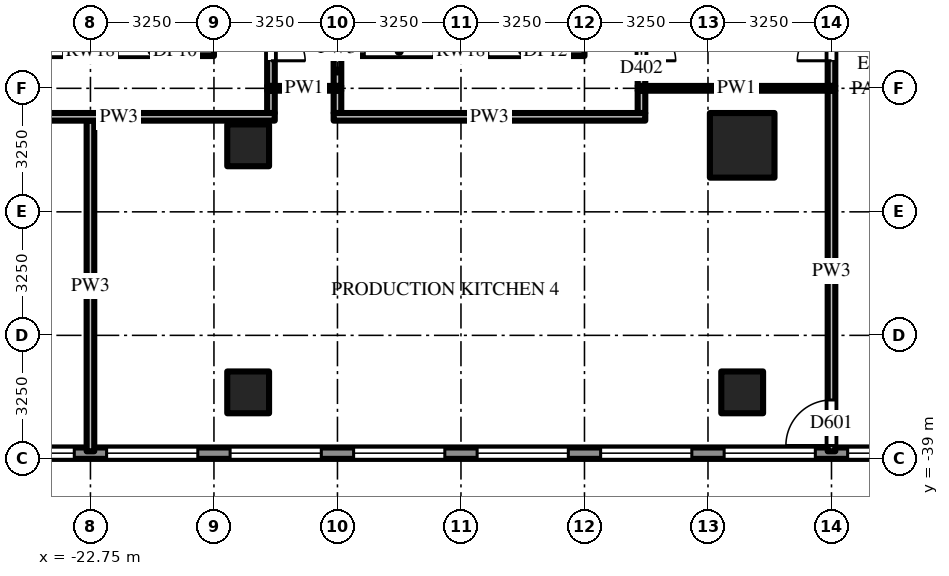
"""IFC4 building model, lengths in metres.
Left out: names, types, materials, properties, quantities, classifications, styles, units other than length and angle.
Written with IfcOpenShell. Run it as: python <this file> out.ifc"""

import sys

from ifc_helpers import new_model, si_unit, direction, frame, frame_2d, origin, origin_2d, place, context, subcontext, project, spatial, rectangle, extrude, source, transform, mapped, element, fill, save


model = new_model("IFC4")
c1 = context("Model", 3, precision=1e-05, world=origin(), true_north=direction((0.0, 1.0)))
c2 = subcontext(c1, "Body", "Model", "MODEL_VIEW")
j1 = project(units=[si_unit("LENGTHUNIT", "METRE"), si_unit("PLANEANGLEUNIT", "RADIAN")], contexts=[c1])
p1 = place(None, origin())
s1 = spatial("IfcSite", under=j1, at=p1, CompositionType="ELEMENT")
p2 = place(p1, origin())
s2 = spatial("IfcBuilding", under=s1, at=p2, CompositionType="ELEMENT")
p3 = place(p2, frame((0.0, 0.0, 14.0)))
s3 = spatial("IfcBuildingStorey", under=s2, at=p3, CompositionType="ELEMENT", Elevation=14.0)
m1 = source(origin(), c2, "Body", "SweptSolid", [
    extrude(rectangle(XDim=1.7, YDim=1.7, at=origin_2d()), origin(), (0.0, 0.0, 1.0), 5.0),
])
p4 = place(p3, frame((-5.6, -30.75, 0.0), z_axis=(0.0, 0.0, 1.0), x_axis=(1.0, 0.0, 0.0)))
e1 = element("IfcColumn", 1, at=p4, inside=s3, PredefinedType="COLUMN", context=c2, shape_type="MappedRepresentation", body=[
    mapped(m1, transform((0.0, 0.0, 0.0))),
])
m2 = source(origin(), c2, "Body", "SweptSolid", [
    extrude(rectangle(XDim=1.1, YDim=1.1, at=origin_2d()), origin(), (0.0, 0.0, 1.0), 5.0),
])
for number, where, z_axis, x_axis in (
    (2, (-5.6, -37.25, 0.0), (0.0, 0.0, 1.0), (1.0, 0.0, 0.0)),
    (3, (-18.6, -30.75, 0.0), (0.0, 0.0, 1.0), (1.0, 0.0, 0.0)),
    (4, (-18.6, -37.25, 0.0), (0.0, 0.0, 1.0), (1.0, 0.0, 0.0)),
):
    element("IfcColumn", number, at=place(p3, frame(where, z_axis=z_axis, x_axis=x_axis)), inside=s3, PredefinedType="COLUMN", context=c2, shape_type="MappedRepresentation", body=[
        mapped(m2, transform((0.0, 0.0, 0.0))),
    ])
m3 = source(origin(), c2, "Body", "SweptSolid", [
    extrude(rectangle(XDim=6.5, YDim=0.25, at=frame_2d((3.25, 0.0))), origin(), (0.0, 0.0, 1.0), 4.7),
])
p5 = place(p3, frame((-26.0, -28.275, 0.0), z_axis=(0.0, 0.0, 1.0), x_axis=(1.0, 0.0, 0.0)))
e5 = element("IfcWall", 5, at=p5, inside=s3, PredefinedType="SHEAR", context=c2, shape_type="MappedRepresentation", body=[
    mapped(m3, transform((0.0, 0.0, 0.0))),
])
m4 = source(origin(), c2, "Body", "SweptSolid", [
    extrude(rectangle(XDim=1.8, YDim=2.1, at=frame_2d((0.9, 1.05))), frame((0.0, 0.135, 0.0), z_axis=(0.0, -1.0, 0.0), x_axis=(1.0, 0.0, 0.0)), (0.0, 0.0, 1.0), 0.27),
])
p6 = place(p5, frame((0.725, 0.0, 0.0)))
e6 = element("IfcOpeningElement", 6, at=p6, cuts=e5, PredefinedType="OPENING", context=c2, shape_type="MappedRepresentation", body=[
    mapped(m4, transform((0.0, 0.0, 0.0))),
])
p7 = place(p5, frame((3.975, 0.0, 0.0)))
e7 = element("IfcOpeningElement", 7, at=p7, cuts=e5, PredefinedType="OPENING", context=c2, shape_type="MappedRepresentation", body=[
    mapped(m4, transform((0.0, 0.0, 0.0))),
])
p8 = place(p3, frame((-16.25, -28.275, 0.0), z_axis=(0.0, 0.0, 1.0), x_axis=(1.0, 0.0, 0.0)))
e8 = element("IfcWall", 8, at=p8, inside=s3, PredefinedType="SHEAR", context=c2, shape_type="MappedRepresentation", body=[
    mapped(m3, transform((0.0, 0.0, 0.0))),
])
p9 = place(p8, frame((0.725, 0.0, 0.0)))
e9 = element("IfcOpeningElement", 9, at=p9, cuts=e8, PredefinedType="OPENING", context=c2, shape_type="MappedRepresentation", body=[
    mapped(m4, transform((0.0, 0.0, 0.0))),
])
p10 = place(p8, frame((3.975, 0.0, 0.0)))
e10 = element("IfcOpeningElement", 10, at=p10, cuts=e8, PredefinedType="OPENING", context=c2, shape_type="MappedRepresentation", body=[
    mapped(m4, transform((0.0, 0.0, 0.0))),
])
m5 = source(origin(), c2, "Body", "SweptSolid", [
    extrude(rectangle(XDim=71.5, YDim=0.3, at=frame_2d((35.75, 0.0))), origin(), (0.0, 0.0, 1.0), 4.7),
])
p11 = place(p3, frame((-35.75, -38.85, 0.0), z_axis=(0.0, 0.0, 1.0), x_axis=(1.0, 0.0, 0.0)))
e11 = element("IfcWall", 11, at=p11, inside=s3, PredefinedType="SOLIDWALL", context=c2, shape_type="MappedRepresentation", body=[
    mapped(m5, transform((0.0, 0.0, 0.0))),
])
m6 = source(origin(), c2, "Body", "SweptSolid", [
    extrude(rectangle(XDim=2.4, YDim=3.0, at=frame_2d((1.2, 1.5))), frame((0.0, 0.16, 0.0), z_axis=(0.0, -1.0, 0.0), x_axis=(1.0, 0.0, 0.0)), (0.0, 0.0, 1.0), 0.32),
])
p12 = place(p11, frame((0.425, 0.0, 0.9)))
e12 = element("IfcOpeningElement", 12, at=p12, cuts=e11, PredefinedType="OPENING", context=c2, shape_type="MappedRepresentation", body=[
    mapped(m6, transform((0.0, 0.0, 0.0))),
])
p13 = place(p11, frame((3.675, 0.0, 0.9)))
e13 = element("IfcOpeningElement", 13, at=p13, cuts=e11, PredefinedType="OPENING", context=c2, shape_type="MappedRepresentation", body=[
    mapped(m6, transform((0.0, 0.0, 0.0))),
])
p14 = place(p11, frame((6.925, 0.0, 0.9)))
e14 = element("IfcOpeningElement", 14, at=p14, cuts=e11, PredefinedType="OPENING", context=c2, shape_type="MappedRepresentation", body=[
    mapped(m6, transform((0.0, 0.0, 0.0))),
])
p15 = place(p11, frame((10.175, 0.0, 0.9)))
e15 = element("IfcOpeningElement", 15, at=p15, cuts=e11, PredefinedType="OPENING", context=c2, shape_type="MappedRepresentation", body=[
    mapped(m6, transform((0.0, 0.0, 0.0))),
])
p16 = place(p11, frame((13.425, 0.0, 0.9)))
e16 = element("IfcOpeningElement", 16, at=p16, cuts=e11, PredefinedType="OPENING", context=c2, shape_type="MappedRepresentation", body=[
    mapped(m6, transform((0.0, 0.0, 0.0))),
])
p17 = place(p11, frame((16.675, 0.0, 0.9)))
e17 = element("IfcOpeningElement", 17, at=p17, cuts=e11, PredefinedType="OPENING", context=c2, shape_type="MappedRepresentation", body=[
    mapped(m6, transform((0.0, 0.0, 0.0))),
])
p18 = place(p11, frame((19.925, 0.0, 0.9)))
e18 = element("IfcOpeningElement", 18, at=p18, cuts=e11, PredefinedType="OPENING", context=c2, shape_type="MappedRepresentation", body=[
    mapped(m6, transform((0.0, 0.0, 0.0))),
])
p19 = place(p11, frame((23.175, 0.0, 0.9)))
e19 = element("IfcOpeningElement", 19, at=p19, cuts=e11, PredefinedType="OPENING", context=c2, shape_type="MappedRepresentation", body=[
    mapped(m6, transform((0.0, 0.0, 0.0))),
])
p20 = place(p11, frame((26.425, 0.0, 0.9)))
e20 = element("IfcOpeningElement", 20, at=p20, cuts=e11, PredefinedType="OPENING", context=c2, shape_type="MappedRepresentation", body=[
    mapped(m6, transform((0.0, 0.0, 0.0))),
])
p21 = place(p11, frame((29.675, 0.0, 0.9)))
e21 = element("IfcOpeningElement", 21, at=p21, cuts=e11, PredefinedType="OPENING", context=c2, shape_type="MappedRepresentation", body=[
    mapped(m6, transform((0.0, 0.0, 0.0))),
])
p22 = place(p11, frame((32.925, 0.0, 0.9)))
e22 = element("IfcOpeningElement", 22, at=p22, cuts=e11, PredefinedType="OPENING", context=c2, shape_type="MappedRepresentation", body=[
    mapped(m6, transform((0.0, 0.0, 0.0))),
])
p23 = place(p11, frame((36.175, 0.0, 0.9)))
e23 = element("IfcOpeningElement", 23, at=p23, cuts=e11, PredefinedType="OPENING", context=c2, shape_type="MappedRepresentation", body=[
    mapped(m6, transform((0.0, 0.0, 0.0))),
])
p24 = place(p11, frame((39.425, 0.0, 0.9)))
e24 = element("IfcOpeningElement", 24, at=p24, cuts=e11, PredefinedType="OPENING", context=c2, shape_type="MappedRepresentation", body=[
    mapped(m6, transform((0.0, 0.0, 0.0))),
])
p25 = place(p11, frame((42.675, 0.0, 0.9)))
e25 = element("IfcOpeningElement", 25, at=p25, cuts=e11, PredefinedType="OPENING", context=c2, shape_type="MappedRepresentation", body=[
    mapped(m6, transform((0.0, 0.0, 0.0))),
])
p26 = place(p11, frame((45.925, 0.0, 0.9)))
e26 = element("IfcOpeningElement", 26, at=p26, cuts=e11, PredefinedType="OPENING", context=c2, shape_type="MappedRepresentation", body=[
    mapped(m6, transform((0.0, 0.0, 0.0))),
])
p27 = place(p11, frame((49.175, 0.0, 0.9)))
e27 = element("IfcOpeningElement", 27, at=p27, cuts=e11, PredefinedType="OPENING", context=c2, shape_type="MappedRepresentation", body=[
    mapped(m6, transform((0.0, 0.0, 0.0))),
])
p28 = place(p11, frame((52.425, 0.0, 0.9)))
e28 = element("IfcOpeningElement", 28, at=p28, cuts=e11, PredefinedType="OPENING", context=c2, shape_type="MappedRepresentation", body=[
    mapped(m6, transform((0.0, 0.0, 0.0))),
])
p29 = place(p11, frame((55.675, 0.0, 0.9)))
e29 = element("IfcOpeningElement", 29, at=p29, cuts=e11, PredefinedType="OPENING", context=c2, shape_type="MappedRepresentation", body=[
    mapped(m6, transform((0.0, 0.0, 0.0))),
])
p30 = place(p11, frame((58.925, 0.0, 0.9)))
e30 = element("IfcOpeningElement", 30, at=p30, cuts=e11, PredefinedType="OPENING", context=c2, shape_type="MappedRepresentation", body=[
    mapped(m6, transform((0.0, 0.0, 0.0))),
])
p31 = place(p11, frame((62.175, 0.0, 0.9)))
e31 = element("IfcOpeningElement", 31, at=p31, cuts=e11, PredefinedType="OPENING", context=c2, shape_type="MappedRepresentation", body=[
    mapped(m6, transform((0.0, 0.0, 0.0))),
])
p32 = place(p11, frame((65.425, 0.0, 0.9)))
e32 = element("IfcOpeningElement", 32, at=p32, cuts=e11, PredefinedType="OPENING", context=c2, shape_type="MappedRepresentation", body=[
    mapped(m6, transform((0.0, 0.0, 0.0))),
])
p33 = place(p11, frame((68.675, 0.0, 0.9)))
e33 = element("IfcOpeningElement", 33, at=p33, cuts=e11, PredefinedType="OPENING", context=c2, shape_type="MappedRepresentation", body=[
    mapped(m6, transform((0.0, 0.0, 0.0))),
])
m7 = source(origin(), c2, "Body", "SweptSolid", [
    extrude(rectangle(XDim=8.7, YDim=0.2, at=frame_2d((4.35, 0.0))), origin(), (0.0, 0.0, 1.0), 3.762),
])
p34 = place(p3, frame((-22.75, -38.8, 0.0), z_axis=(0.0, 0.0, 1.0), x_axis=(0.0, 1.0, 0.0)))
e34 = element("IfcWall", 34, at=p34, inside=s3, PredefinedType="PARTITIONING", context=c2, shape_type="MappedRepresentation", body=[
    mapped(m7, transform((0.0, 0.0, 0.0))),
])
m8 = source(origin(), c2, "Body", "SweptSolid", [
    extrude(rectangle(XDim=3.087, YDim=0.2, at=frame_2d((1.544, 0.0))), origin(), (0.0, 0.0, 1.0), 4.274),
])
p35 = place(p3, frame((-18.0, -26.1, 0.0), z_axis=(0.0, 0.0, 1.0), x_axis=(0.0, -1.0, 0.0)))
e35 = element("IfcWall", 35, at=p35, inside=s3, PredefinedType="PARTITIONING", context=c2, shape_type="MappedRepresentation", body=[
    mapped(m8, transform((0.0, 0.0, 0.0))),
])
m9 = source(origin(), c2, "Body", "SweptSolid", [
    extrude(rectangle(XDim=1.8, YDim=2.1, at=frame_2d((0.9, 1.05))), frame((0.0, 0.11, 0.0), z_axis=(0.0, -1.0, 0.0), x_axis=(1.0, 0.0, 0.0)), (0.0, 0.0, 1.0), 0.22),
])
p36 = place(p35, frame((0.625, 0.0, 0.0)))
e36 = element("IfcOpeningElement", 36, at=p36, cuts=e35, PredefinedType="OPENING", context=c2, shape_type="MappedRepresentation", body=[
    mapped(m9, transform((0.0, 0.0, 0.0))),
])
m10 = source(origin(), c2, "Body", "SweptSolid", [
    extrude(rectangle(XDim=0.587, YDim=0.2, at=frame_2d((0.294, 0.0))), origin(), (0.0, 0.0, 1.0), 4.7),
])
p37 = place(p3, frame((-18.0, -29.312, 0.0), z_axis=(0.0, 0.0, 1.0), x_axis=(0.0, -1.0, 0.0)))
e37 = element("IfcWall", 37, at=p37, inside=s3, PredefinedType="PARTITIONING", context=c2, shape_type="MappedRepresentation", body=[
    mapped(m10, transform((0.0, 0.0, 0.0))),
])
m11 = source(origin(), c2, "Body", "SweptSolid", [
    extrude(rectangle(XDim=0.788, YDim=0.2, at=frame_2d((0.394, 0.0))), origin(), (0.0, 0.0, 1.0), 4.7),
])
p38 = place(p3, frame((-16.25, -29.188, 0.0), z_axis=(0.0, 0.0, 1.0), x_axis=(0.0, 1.0, 0.0)))
e38 = element("IfcWall", 38, at=p38, inside=s3, PredefinedType="PARTITIONING", context=c2, shape_type="MappedRepresentation", body=[
    mapped(m11, transform((0.0, 0.0, 0.0))),
])
p39 = place(p3, frame((-16.25, -29.312, 0.0), z_axis=(0.0, 0.0, 1.0), x_axis=(0.0, -1.0, 0.0)))
e39 = element("IfcWall", 39, at=p39, inside=s3, PredefinedType="PARTITIONING", context=c2, shape_type="MappedRepresentation", body=[
    mapped(m10, transform((0.0, 0.0, 0.0))),
])
p40 = place(p3, frame((-8.25, -26.1, 0.0), z_axis=(0.0, 0.0, 1.0), x_axis=(0.0, -1.0, 0.0)))
e40 = element("IfcWall", 40, at=p40, inside=s3, PredefinedType="PARTITIONING", context=c2, shape_type="MappedRepresentation", body=[
    mapped(m8, transform((0.0, 0.0, 0.0))),
])
p41 = place(p40, frame((0.625, 0.0, 0.0)))
e41 = element("IfcOpeningElement", 41, at=p41, cuts=e40, PredefinedType="OPENING", context=c2, shape_type="MappedRepresentation", body=[
    mapped(m9, transform((0.0, 0.0, 0.0))),
])
p42 = place(p3, frame((-8.25, -29.9, 0.0), z_axis=(0.0, 0.0, 1.0), x_axis=(0.0, 1.0, 0.0)))
e42 = element("IfcWall", 42, at=p42, inside=s3, PredefinedType="PARTITIONING", context=c2, shape_type="MappedRepresentation", body=[
    mapped(m10, transform((0.0, 0.0, 0.0))),
])
m12 = source(origin(), c2, "Body", "SweptSolid", [
    extrude(rectangle(XDim=3.188, YDim=0.2, at=frame_2d((1.594, 0.0))), origin(), (0.0, 0.0, 1.0), 4.7),
])
p43 = place(p3, frame((-3.25, -29.188, 0.0), z_axis=(0.0, 0.0, 1.0), x_axis=(0.0, 1.0, 0.0)))
e43 = element("IfcWall", 43, at=p43, inside=s3, PredefinedType="PARTITIONING", context=c2, shape_type="MappedRepresentation", body=[
    mapped(m12, transform((0.0, 0.0, 0.0))),
])
p44 = place(p43, frame((0.663, 0.0, 0.0)))
e44 = element("IfcOpeningElement", 44, at=p44, cuts=e43, PredefinedType="OPENING", context=c2, shape_type="MappedRepresentation", body=[
    mapped(m9, transform((0.0, 0.0, 0.0))),
])
m13 = source(origin(), c2, "Body", "SweptSolid", [
    extrude(rectangle(XDim=9.488, YDim=0.2, at=frame_2d((4.744, 0.0))), origin(), (0.0, 0.0, 1.0), 3.918),
])
p45 = place(p3, frame((-3.25, -38.8, 0.0), z_axis=(0.0, 0.0, 1.0), x_axis=(0.0, 1.0, 0.0)))
e45 = element("IfcWall", 45, at=p45, inside=s3, PredefinedType="PARTITIONING", context=c2, shape_type="MappedRepresentation", body=[
    mapped(m13, transform((0.0, 0.0, 0.0))),
])
m14 = source(origin(), c2, "Body", "SweptSolid", [
    extrude(rectangle(XDim=1.2, YDim=2.1, at=frame_2d((0.6, 1.05))), frame((0.0, 0.11, 0.0), z_axis=(0.0, -1.0, 0.0), x_axis=(1.0, 0.0, 0.0)), (0.0, 0.0, 1.0), 0.22),
])
p46 = place(p45, frame((0.15, 0.0, 0.0)))
e46 = element("IfcOpeningElement", 46, at=p46, cuts=e45, PredefinedType="OPENING", context=c2, shape_type="MappedRepresentation", body=[
    mapped(m14, transform((0.0, 0.0, 0.0))),
])
m15 = source(origin(), c2, "Body", "SweptSolid", [
    extrude(rectangle(XDim=8.2, YDim=0.2, at=frame_2d((4.1, 0.0))), origin(), (0.0, 0.0, 1.0), 3.762),
])
p47 = place(p3, frame((-17.9, -30.0, 0.0), z_axis=(0.0, 0.0, 1.0), x_axis=(-1.0, 0.0, 0.0)))
e47 = element("IfcWall", 47, at=p47, inside=s3, PredefinedType="PARTITIONING", context=c2, shape_type="MappedRepresentation", body=[
    mapped(m15, transform((0.0, 0.0, 0.0))),
])
m16 = source(origin(), c2, "Body", "SweptSolid", [
    extrude(rectangle(XDim=8.2, YDim=0.2, at=frame_2d((4.1, 0.0))), origin(), (0.0, 0.0, 1.0), 4.7),
])
p48 = place(p3, frame((-8.15, -30.0, 0.0), z_axis=(0.0, 0.0, 1.0), x_axis=(-1.0, 0.0, 0.0)))
e48 = element("IfcWall", 48, at=p48, inside=s3, PredefinedType="PARTITIONING", context=c2, shape_type="MappedRepresentation", body=[
    mapped(m16, transform((0.0, 0.0, 0.0))),
])
m17 = source(origin(), c2, "Body", "SweptSolid", [
    extrude(rectangle(XDim=1.95, YDim=0.125, at=frame_2d((0.975, 0.0))), origin(), (0.0, 0.0, 1.0), 4.7),
])
p49 = place(p3, frame((-16.15, -29.25, 0.0), z_axis=(0.0, 0.0, 1.0), x_axis=(-1.0, 0.0, 0.0)))
e49 = element("IfcWall", 49, at=p49, inside=s3, PredefinedType="PARTITIONING", context=c2, shape_type="MappedRepresentation", body=[
    mapped(m17, transform((0.0, 0.0, 0.0))),
])
p50 = place(p3, frame((-3.15, -29.25, 0.0), z_axis=(0.0, 0.0, 1.0), x_axis=(-1.0, 0.0, 0.0)))
e50 = element("IfcWall", 50, at=p50, inside=s3, PredefinedType="PARTITIONING", context=c2, shape_type="SweptSolid", body=[
    extrude(rectangle(XDim=5.2, YDim=0.125, at=frame_2d((2.6, 0.0))), origin(), (0.0, 0.0, 1.0), 3.918),
])
m18 = source(origin(), c2, "Body", "SweptSolid", [
    extrude(rectangle(XDim=2.4, YDim=3.0, at=frame_2d((1.2, 1.5))), frame((0.0, 0.03, 0.0), z_axis=(0.0, -1.0, 0.0), x_axis=(1.0, 0.0, 0.0)), (0.0, 0.0, 1.0), 0.06),
])
p51 = place(p15, origin())
e51 = element("IfcWindow", 51, at=p51, inside=s3, PartitioningType="SINGLE_PANEL", PredefinedType="WINDOW", context=c2, shape_type="MappedRepresentation", body=[
    mapped(m18, transform((0.0, 0.0, 0.0))),
])
fill(e15, e51)
p52 = place(p16, origin())
e52 = element("IfcWindow", 52, at=p52, inside=s3, PartitioningType="SINGLE_PANEL", PredefinedType="WINDOW", context=c2, shape_type="MappedRepresentation", body=[
    mapped(m18, transform((0.0, 0.0, 0.0))),
])
fill(e16, e52)
p53 = place(p17, origin())
e53 = element("IfcWindow", 53, at=p53, inside=s3, PartitioningType="SINGLE_PANEL", PredefinedType="WINDOW", context=c2, shape_type="MappedRepresentation", body=[
    mapped(m18, transform((0.0, 0.0, 0.0))),
])
fill(e17, e53)
p54 = place(p18, origin())
e54 = element("IfcWindow", 54, at=p54, inside=s3, PartitioningType="SINGLE_PANEL", PredefinedType="WINDOW", context=c2, shape_type="MappedRepresentation", body=[
    mapped(m18, transform((0.0, 0.0, 0.0))),
])
fill(e18, e54)
p55 = place(p19, origin())
e55 = element("IfcWindow", 55, at=p55, inside=s3, PartitioningType="SINGLE_PANEL", PredefinedType="WINDOW", context=c2, shape_type="MappedRepresentation", body=[
    mapped(m18, transform((0.0, 0.0, 0.0))),
])
fill(e19, e55)
p56 = place(p20, origin())
e56 = element("IfcWindow", 56, at=p56, inside=s3, PartitioningType="SINGLE_PANEL", PredefinedType="WINDOW", context=c2, shape_type="MappedRepresentation", body=[
    mapped(m18, transform((0.0, 0.0, 0.0))),
])
fill(e20, e56)
p57 = place(p21, origin())
e57 = element("IfcWindow", 57, at=p57, inside=s3, PartitioningType="SINGLE_PANEL", PredefinedType="WINDOW", context=c2, shape_type="MappedRepresentation", body=[
    mapped(m18, transform((0.0, 0.0, 0.0))),
])
fill(e21, e57)
p58 = place(p22, origin())
e58 = element("IfcWindow", 58, at=p58, inside=s3, PartitioningType="SINGLE_PANEL", PredefinedType="WINDOW", context=c2, shape_type="MappedRepresentation", body=[
    mapped(m18, transform((0.0, 0.0, 0.0))),
])
fill(e22, e58)
m19 = source(origin(), c2, "Body", "SweptSolid", [
    extrude(rectangle(XDim=1.2, YDim=2.1, at=frame_2d((0.6, 1.05))), frame((0.0, 0.025, 0.0), z_axis=(0.0, -1.0, 0.0), x_axis=(1.0, 0.0, 0.0)), (0.0, 0.0, 1.0), 0.05),
])
p59 = place(p46, origin())
e59 = element("IfcDoor", 59, at=p59, inside=s3, OperationType="SINGLE_SWING_LEFT", PredefinedType="DOOR", context=c2, shape_type="MappedRepresentation", body=[
    mapped(m19, transform((0.0, 0.0, 0.0))),
])
fill(e46, e59)
m20 = source(origin(), c2, "Body", "SweptSolid", [
    extrude(rectangle(XDim=1.8, YDim=2.1, at=frame_2d((0.9, 1.05))), frame((0.0, 0.025, 0.0), z_axis=(0.0, -1.0, 0.0), x_axis=(1.0, 0.0, 0.0)), (0.0, 0.0, 1.0), 0.05),
])
p60 = place(p36, origin())
e60 = element("IfcDoor", 60, at=p60, inside=s3, OperationType="DOUBLE_DOOR_SINGLE_SWING", PredefinedType="DOOR", context=c2, shape_type="MappedRepresentation", body=[
    mapped(m20, transform((0.0, 0.0, 0.0))),
])
fill(e36, e60)
p61 = place(p41, origin())
e61 = element("IfcDoor", 61, at=p61, inside=s3, OperationType="DOUBLE_DOOR_SINGLE_SWING", PredefinedType="DOOR", context=c2, shape_type="MappedRepresentation", body=[
    mapped(m20, transform((0.0, 0.0, 0.0))),
])
fill(e41, e61)
p62 = place(p44, origin())
e62 = element("IfcDoor", 62, at=p62, inside=s3, OperationType="DOUBLE_DOOR_SINGLE_SWING", PredefinedType="DOOR", context=c2, shape_type="MappedRepresentation", body=[
    mapped(m20, transform((0.0, 0.0, 0.0))),
])
fill(e44, e62)
save(model, sys.argv[1])
